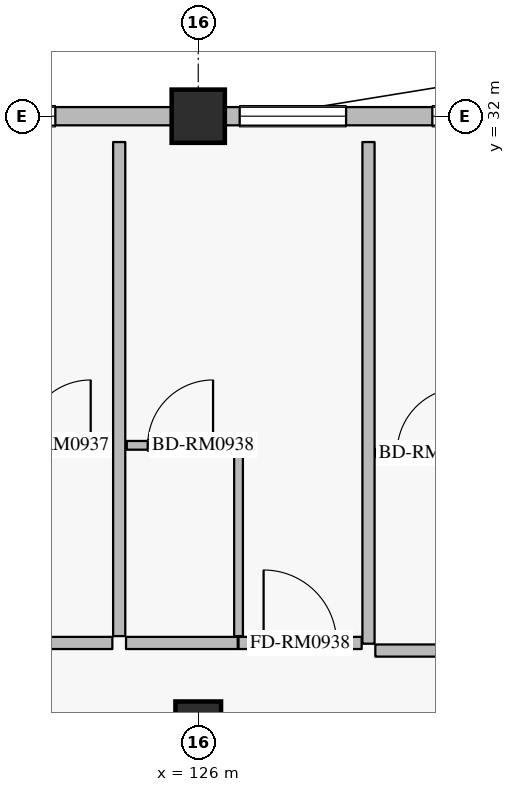
"""IFC4 building model, lengths in metres.
Left out: names, types, materials, properties, quantities, classifications, styles, units other than length and angle.
Written with IfcOpenShell. Run it as: python <this file> out.ifc"""

import sys

from ifc_helpers import new_model, si_unit, direction, frame, frame_2d, origin, origin_2d, place, context, subcontext, project, spatial, rectangle, extrude, element, fill, save


model = new_model("IFC4")
c1 = context("Model", 3, precision=1e-05, world=origin(), true_north=direction((0.0, 1.0)))
c2 = subcontext(c1, "Body", "Model", "MODEL_VIEW")
j1 = project(units=[si_unit("LENGTHUNIT", "METRE"), si_unit("PLANEANGLEUNIT", "RADIAN")], contexts=[c1])
p1 = place(None, origin())
s1 = spatial("IfcSite", under=j1, at=p1, CompositionType="ELEMENT")
p2 = place(p1, origin())
s2 = spatial("IfcBuilding", under=s1, at=p2, CompositionType="ELEMENT")
p3 = place(p2, frame((0.0, 0.0, 36.0)))
s3 = spatial("IfcBuildingStorey", under=s2, at=p3, CompositionType="ELEMENT", Elevation=36.0)
p4 = place(p3, frame((126.0, 32.0, 0.0), z_axis=(0.0, 0.0, 1.0), x_axis=(1.0, 0.0, 0.0)))
e1 = element("IfcColumn", 1, at=p4, inside=s3, PredefinedType="COLUMN", context=c2, shape_type="SweptSolid", body=[
    extrude(rectangle(XDim=0.7, YDim=0.7, at=origin_2d()), origin(), (0.0, 0.0, 1.0), 3.6),
])
p5 = place(p3, frame((126.0, 24.0, 0.0), z_axis=(0.0, 0.0, 1.0), x_axis=(1.0, 0.0, 0.0)))
e2 = element("IfcColumn", 2, at=p5, inside=s3, PredefinedType="COLUMN", context=c2, shape_type="SweptSolid", body=[
    extrude(rectangle(XDim=0.6, YDim=0.6, at=origin_2d()), origin(), (0.0, 0.0, 1.0), 3.6),
])
p6 = place(p3, frame((117.95, 32.0, 0.0), z_axis=(0.0, 0.0, 1.0), x_axis=(1.0, 0.0, 0.0)))
e3 = element("IfcWall", 3, at=p6, inside=s3, PredefinedType="SOLIDWALL", context=c2, shape_type="SweptSolid", body=[
    extrude(rectangle(XDim=7.7, YDim=0.24, at=frame_2d((3.85, 0.0))), origin(), (0.0, 0.0, 1.0), 2.94),
])
p7 = place(p6, frame((1.29, 0.0, 0.8)))
e4 = element("IfcOpeningElement", 4, at=p7, cuts=e3, PredefinedType="OPENING", context=c2, shape_type="SweptSolid", body=[
    extrude(rectangle(XDim=1.6, YDim=1.6, at=frame_2d((0.8, 0.8))), frame((0.0, 0.13, 0.0), z_axis=(0.0, -1.0, 0.0), x_axis=(1.0, 0.0, 0.0)), (0.0, 0.0, 1.0), 0.26),
])
p8 = place(p6, frame((4.57, 0.0, 0.8)))
e5 = element("IfcOpeningElement", 5, at=p8, cuts=e3, PredefinedType="OPENING", context=c2, shape_type="SweptSolid", body=[
    extrude(rectangle(XDim=1.6, YDim=1.6, at=frame_2d((0.8, 0.8))), frame((0.0, 0.13, 0.0), z_axis=(0.0, -1.0, 0.0), x_axis=(1.0, 0.0, 0.0)), (0.0, 0.0, 1.0), 0.26),
])
p9 = place(p3, frame((126.35, 32.0, 0.0), z_axis=(0.0, 0.0, 1.0), x_axis=(1.0, 0.0, 0.0)))
e6 = element("IfcWall", 6, at=p9, inside=s3, PredefinedType="SOLIDWALL", context=c2, shape_type="SweptSolid", body=[
    extrude(rectangle(XDim=7.7, YDim=0.24, at=frame_2d((3.85, 0.0))), origin(), (0.0, 0.0, 1.0), 2.94),
])
p10 = place(p9, frame((0.195, 0.0, 0.8)))
e7 = element("IfcOpeningElement", 7, at=p10, cuts=e6, PredefinedType="OPENING", context=c2, shape_type="SweptSolid", body=[
    extrude(rectangle(XDim=1.4, YDim=1.6, at=frame_2d((0.7, 0.8))), frame((0.0, 0.13, 0.0), z_axis=(0.0, -1.0, 0.0), x_axis=(1.0, 0.0, 0.0)), (0.0, 0.0, 1.0), 0.26),
])
p11 = place(p9, frame((2.73, 0.0, 0.8)))
e8 = element("IfcOpeningElement", 8, at=p11, cuts=e6, PredefinedType="OPENING", context=c2, shape_type="SweptSolid", body=[
    extrude(rectangle(XDim=1.6, YDim=1.6, at=frame_2d((0.8, 0.8))), frame((0.0, 0.13, 0.0), z_axis=(0.0, -1.0, 0.0), x_axis=(1.0, 0.0, 0.0)), (0.0, 0.0, 1.0), 0.26),
])
p12 = place(p9, frame((5.685, 0.0, 0.8)))
e9 = element("IfcOpeningElement", 9, at=p12, cuts=e6, PredefinedType="OPENING", context=c2, shape_type="SweptSolid", body=[
    extrude(rectangle(XDim=1.6, YDim=1.6, at=frame_2d((0.8, 0.8))), frame((0.0, 0.13, 0.0), z_axis=(0.0, -1.0, 0.0), x_axis=(1.0, 0.0, 0.0)), (0.0, 0.0, 1.0), 0.26),
])
p13 = place(p3, frame((123.4, 25.07, 0.0), z_axis=(0.0, 0.0, 1.0), x_axis=(1.0, 0.0, 0.0)))
e10 = element("IfcWall", 10, at=p13, inside=s3, PredefinedType="PARTITIONING", context=c2, shape_type="SweptSolid", body=[
    extrude(rectangle(XDim=1.47, YDim=0.16, at=frame_2d((0.735, 0.0))), origin(), (0.0, 0.0, 1.0), 3.365),
])
p14 = place(p3, frame((123.45, 27.67, 0.0), z_axis=(0.0, 0.0, 1.0), x_axis=(1.0, 0.0, 0.0)))
e11 = element("IfcWall", 11, at=p14, inside=s3, PredefinedType="PARTITIONING", context=c2, shape_type="SweptSolid", body=[
    extrude(rectangle(XDim=1.41, YDim=0.115, at=frame_2d((0.705, 0.0))), origin(), (0.0, 0.0, 1.0), 3.365),
])
p15 = place(p14, frame((0.275, 0.0, 0.0)))
e12 = element("IfcOpeningElement", 12, at=p15, cuts=e11, PredefinedType="OPENING", context=c2, shape_type="SweptSolid", body=[
    extrude(rectangle(XDim=0.86, YDim=2.12, at=frame_2d((0.43, 1.06))), frame((0.0, 0.067, 0.0), z_axis=(0.0, -1.0, 0.0), x_axis=(1.0, 0.0, 0.0)), (0.0, 0.0, 1.0), 0.135),
])
p16 = place(p3, frame((125.05, 25.07, 0.0), z_axis=(0.0, 0.0, 1.0), x_axis=(1.0, 0.0, 0.0)))
e13 = element("IfcWall", 13, at=p16, inside=s3, PredefinedType="PARTITIONING", context=c2, shape_type="SweptSolid", body=[
    extrude(rectangle(XDim=1.47, YDim=0.16, at=frame_2d((0.735, 0.0))), origin(), (0.0, 0.0, 1.0), 3.365),
])
p17 = place(p3, frame((126.53, 25.07, 0.0), z_axis=(0.0, 0.0, 1.0), x_axis=(1.0, 0.0, 0.0)))
e14 = element("IfcWall", 14, at=p17, inside=s3, PredefinedType="PARTITIONING", context=c2, shape_type="SweptSolid", body=[
    extrude(rectangle(XDim=1.62, YDim=0.16, at=frame_2d((0.81, 0.0))), origin(), (0.0, 0.0, 1.0), 3.365),
])
p18 = place(p17, frame((0.33, 0.0, 0.0)))
e15 = element("IfcOpeningElement", 15, at=p18, cuts=e14, PredefinedType="OPENING", context=c2, shape_type="SweptSolid", body=[
    extrude(rectangle(XDim=0.96, YDim=2.2, at=frame_2d((0.48, 1.1))), frame((0.0, 0.09, 0.0), z_axis=(0.0, -1.0, 0.0), x_axis=(1.0, 0.0, 0.0)), (0.0, 0.0, 1.0), 0.18),
])
p19 = place(p3, frame((126.53, 25.16, 0.0), z_axis=(0.0, 0.0, 1.0), x_axis=(0.0, 1.0, 0.0)))
e16 = element("IfcWall", 16, at=p19, inside=s3, PredefinedType="PARTITIONING", context=c2, shape_type="SweptSolid", body=[
    extrude(rectangle(XDim=2.45, YDim=0.115, at=frame_2d((1.225, 0.0))), origin(), (0.0, 0.0, 1.0), 3.365),
])
p20 = place(p3, frame((125.06, 27.67, 0.0), z_axis=(0.0, 0.0, 1.0), x_axis=(1.0, 0.0, 0.0)))
e17 = element("IfcWall", 17, at=p20, inside=s3, PredefinedType="PARTITIONING", context=c2, shape_type="SweptSolid", body=[
    extrude(rectangle(XDim=1.41, YDim=0.115, at=frame_2d((0.705, 0.0))), origin(), (0.0, 0.0, 1.0), 3.365),
])
p21 = place(p20, frame((0.275, 0.0, 0.0)))
e18 = element("IfcOpeningElement", 18, at=p21, cuts=e17, PredefinedType="OPENING", context=c2, shape_type="SweptSolid", body=[
    extrude(rectangle(XDim=0.86, YDim=2.12, at=frame_2d((0.43, 1.06))), frame((0.0, 0.067, 0.0), z_axis=(0.0, -1.0, 0.0), x_axis=(1.0, 0.0, 0.0)), (0.0, 0.0, 1.0), 0.135),
])
p22 = place(p3, frame((124.96, 25.16, 0.0), z_axis=(0.0, 0.0, 1.0), x_axis=(0.0, 1.0, 0.0)))
e19 = element("IfcWall", 19, at=p22, inside=s3, PredefinedType="PARTITIONING", context=c2, shape_type="SweptSolid", body=[
    extrude(rectangle(XDim=6.5, YDim=0.16, at=frame_2d((3.25, 0.0))), origin(), (0.0, 0.0, 1.0), 3.365),
])
p23 = place(p3, frame((128.33, 24.97, 0.0), z_axis=(0.0, 0.0, 1.0), x_axis=(1.0, 0.0, 0.0)))
e20 = element("IfcWall", 20, at=p23, inside=s3, PredefinedType="PARTITIONING", context=c2, shape_type="SweptSolid", body=[
    extrude(rectangle(XDim=1.47, YDim=0.16, at=frame_2d((0.735, 0.0))), origin(), (0.0, 0.0, 1.0), 3.365),
])
p24 = place(p3, frame((128.34, 27.57, 0.0), z_axis=(0.0, 0.0, 1.0), x_axis=(1.0, 0.0, 0.0)))
e21 = element("IfcWall", 21, at=p24, inside=s3, PredefinedType="PARTITIONING", context=c2, shape_type="SweptSolid", body=[
    extrude(rectangle(XDim=1.41, YDim=0.115, at=frame_2d((0.705, 0.0))), origin(), (0.0, 0.0, 1.0), 3.365),
])
p25 = place(p24, frame((0.275, 0.0, 0.0)))
e22 = element("IfcOpeningElement", 22, at=p25, cuts=e21, PredefinedType="OPENING", context=c2, shape_type="SweptSolid", body=[
    extrude(rectangle(XDim=0.86, YDim=2.12, at=frame_2d((0.43, 1.06))), frame((0.0, 0.067, 0.0), z_axis=(0.0, -1.0, 0.0), x_axis=(1.0, 0.0, 0.0)), (0.0, 0.0, 1.0), 0.135),
])
p26 = place(p3, frame((128.24, 25.06, 0.0), z_axis=(0.0, 0.0, 1.0), x_axis=(0.0, 1.0, 0.0)))
e23 = element("IfcWall", 23, at=p26, inside=s3, PredefinedType="PARTITIONING", context=c2, shape_type="SweptSolid", body=[
    extrude(rectangle(XDim=6.6, YDim=0.16, at=frame_2d((3.3, 0.0))), origin(), (0.0, 0.0, 1.0), 3.365),
])
p27 = place(p8, origin())
e24 = element("IfcWindow", 24, at=p27, inside=s3, PartitioningType="SINGLE_PANEL", PredefinedType="WINDOW", context=c2, shape_type="SweptSolid", body=[
    extrude(rectangle(XDim=1.6, YDim=1.6, at=frame_2d((0.8, 0.8))), frame((0.0, 0.03, 0.0), z_axis=(0.0, -1.0, 0.0), x_axis=(1.0, 0.0, 0.0)), (0.0, 0.0, 1.0), 0.06),
])
fill(e5, e24)
p28 = place(p10, origin())
e25 = element("IfcWindow", 25, at=p28, inside=s3, PartitioningType="SINGLE_PANEL", PredefinedType="WINDOW", context=c2, shape_type="SweptSolid", body=[
    extrude(rectangle(XDim=1.4, YDim=1.6, at=frame_2d((0.7, 0.8))), frame((0.0, 0.03, 0.0), z_axis=(0.0, -1.0, 0.0), x_axis=(1.0, 0.0, 0.0)), (0.0, 0.0, 1.0), 0.06),
])
fill(e7, e25)
p29 = place(p11, origin())
e26 = element("IfcWindow", 26, at=p29, inside=s3, PartitioningType="SINGLE_PANEL", PredefinedType="WINDOW", context=c2, shape_type="SweptSolid", body=[
    extrude(rectangle(XDim=1.6, YDim=1.6, at=frame_2d((0.8, 0.8))), frame((0.0, 0.03, 0.0), z_axis=(0.0, -1.0, 0.0), x_axis=(1.0, 0.0, 0.0)), (0.0, 0.0, 1.0), 0.06),
])
fill(e8, e26)
p30 = place(p15, origin())
e27 = element("IfcDoor", 27, at=p30, inside=s3, OperationType="SINGLE_SWING_RIGHT", PredefinedType="DOOR", context=c2, shape_type="SweptSolid", body=[
    extrude(rectangle(XDim=0.86, YDim=2.12, at=frame_2d((0.43, 1.06))), frame((0.0, 0.025, 0.0), z_axis=(0.0, -1.0, 0.0), x_axis=(1.0, 0.0, 0.0)), (0.0, 0.0, 1.0), 0.05),
])
fill(e12, e27)
p31 = place(p18, origin())
e28 = element("IfcDoor", 28, at=p31, inside=s3, OperationType="SINGLE_SWING_LEFT", PredefinedType="DOOR", context=c2, shape_type="SweptSolid", body=[
    extrude(rectangle(XDim=0.96, YDim=2.2, at=frame_2d((0.48, 1.1))), frame((0.0, 0.025, 0.0), z_axis=(0.0, -1.0, 0.0), x_axis=(1.0, 0.0, 0.0)), (0.0, 0.0, 1.0), 0.05),
])
fill(e15, e28)
p32 = place(p21, origin())
e29 = element("IfcDoor", 29, at=p32, inside=s3, OperationType="SINGLE_SWING_RIGHT", PredefinedType="DOOR", context=c2, shape_type="SweptSolid", body=[
    extrude(rectangle(XDim=0.86, YDim=2.12, at=frame_2d((0.43, 1.06))), frame((0.0, 0.025, 0.0), z_axis=(0.0, -1.0, 0.0), x_axis=(1.0, 0.0, 0.0)), (0.0, 0.0, 1.0), 0.05),
])
fill(e18, e29)
p33 = place(p25, origin())
e30 = element("IfcDoor", 30, at=p33, inside=s3, OperationType="SINGLE_SWING_RIGHT", PredefinedType="DOOR", context=c2, shape_type="SweptSolid", body=[
    extrude(rectangle(XDim=0.86, YDim=2.12, at=frame_2d((0.43, 1.06))), frame((0.0, 0.025, 0.0), z_axis=(0.0, -1.0, 0.0), x_axis=(1.0, 0.0, 0.0)), (0.0, 0.0, 1.0), 0.05),
])
fill(e22, e30)
save(model, sys.argv[1])
